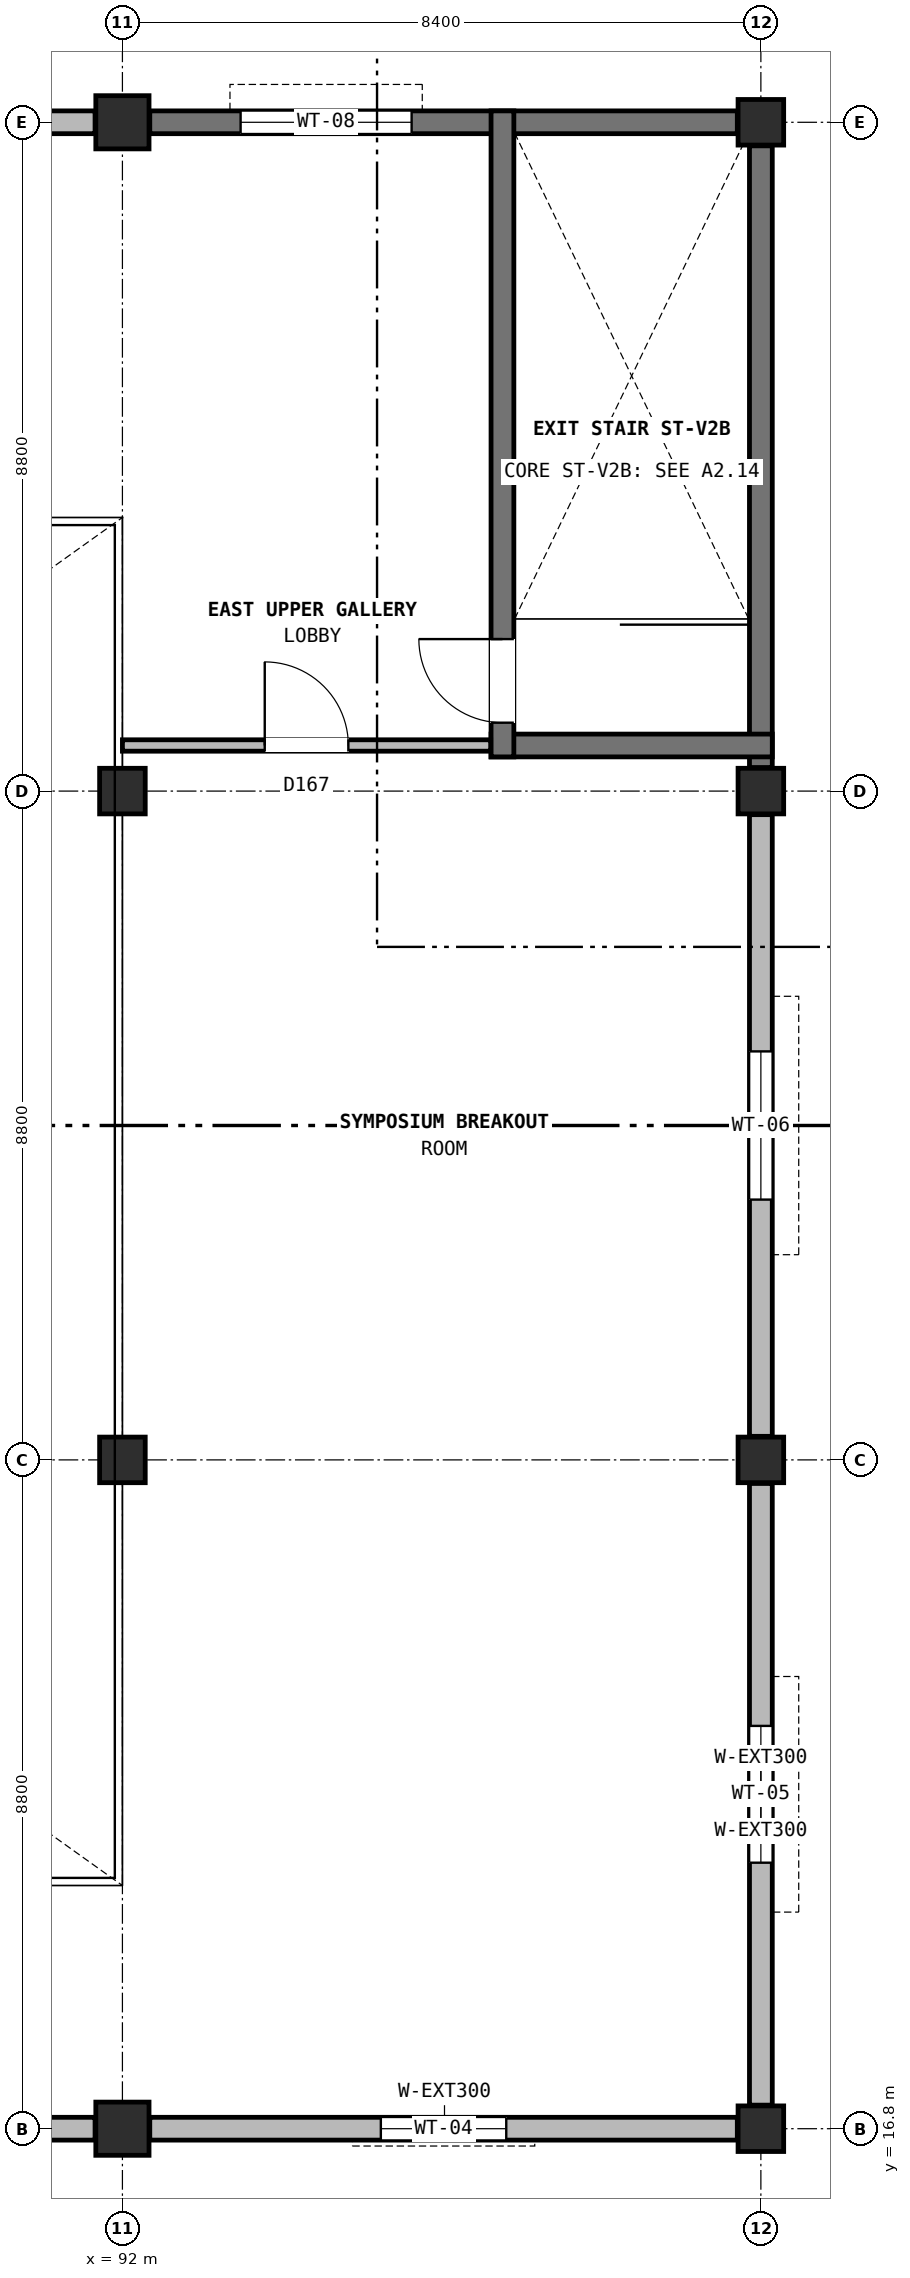
"""IFC4 building model, lengths in metres.
Left out: names, types, materials, properties, quantities, classifications, styles, units other than length and angle.
Written with IfcOpenShell. Run it as: python <this file> out.ifc"""

import sys

from ifc_helpers import new_model, si_unit, direction, frame, frame_2d, origin, origin_2d, place, context, subcontext, project, spatial, rectangle, extrude, element, fill, save


model = new_model("IFC4")
c1 = context("Model", 3, precision=1e-05, world=origin(), true_north=direction((0.0, 1.0)))
c2 = subcontext(c1, "Body", "Model", "MODEL_VIEW")
j1 = project(units=[si_unit("LENGTHUNIT", "METRE"), si_unit("PLANEANGLEUNIT", "RADIAN")], contexts=[c1])
p1 = place(None, origin())
s1 = spatial("IfcSite", under=j1, at=p1, CompositionType="ELEMENT")
p2 = place(p1, origin())
s2 = spatial("IfcBuilding", under=s1, at=p2, CompositionType="ELEMENT")
p3 = place(p2, frame((0.0, 0.0, 9.0)))
s3 = spatial("IfcBuildingStorey", under=s2, at=p3, CompositionType="ELEMENT", Elevation=9.0)
p4 = place(p3, frame((92.0, 16.8, 0.0), z_axis=(0.0, 0.0, 1.0), x_axis=(1.0, 0.0, 0.0)))
e1 = element("IfcColumn", 1, at=p4, inside=s3, PredefinedType="COLUMN", context=c2, shape_type="SweptSolid", body=[
    extrude(rectangle(XDim=0.7, YDim=0.7, at=origin_2d()), origin(), (0.0, 0.0, 1.0), 4.2),
])
for number, where, z_axis, x_axis in (
    (2, (92.0, 25.6, 0.0), (0.0, 0.0, 1.0), (1.0, 0.0, 0.0)),
    (3, (92.0, 34.4, 0.0), (0.0, 0.0, 1.0), (1.0, 0.0, 0.0)),
):
    element("IfcColumn", number, at=place(p3, frame(where, z_axis=z_axis, x_axis=x_axis)), inside=s3, PredefinedType="COLUMN", context=c2, shape_type="SweptSolid", body=[
        extrude(rectangle(XDim=0.6, YDim=0.6, at=origin_2d()), origin(), (0.0, 0.0, 1.0), 4.2),
    ])
p5 = place(p3, frame((92.0, 43.2, 0.0), z_axis=(0.0, 0.0, 1.0), x_axis=(1.0, 0.0, 0.0)))
e4 = element("IfcColumn", 4, at=p5, inside=s3, PredefinedType="COLUMN", context=c2, shape_type="SweptSolid", body=[
    extrude(rectangle(XDim=0.7, YDim=0.7, at=origin_2d()), origin(), (0.0, 0.0, 1.0), 4.2),
])
for number, where, z_axis, x_axis in (
    (5, (100.4, 16.8, 0.0), (0.0, 0.0, 1.0), (1.0, 0.0, 0.0)),
    (6, (100.4, 25.6, 0.0), (0.0, 0.0, 1.0), (1.0, 0.0, 0.0)),
    (7, (100.4, 34.4, 0.0), (0.0, 0.0, 1.0), (1.0, 0.0, 0.0)),
    (8, (100.4, 43.2, 0.0), (0.0, 0.0, 1.0), (1.0, 0.0, 0.0)),
):
    element("IfcColumn", number, at=place(p3, frame(where, z_axis=z_axis, x_axis=x_axis)), inside=s3, PredefinedType="COLUMN", context=c2, shape_type="SweptSolid", body=[
        extrude(rectangle(XDim=0.6, YDim=0.6, at=origin_2d()), origin(), (0.0, 0.0, 1.0), 4.2),
    ])
p6 = place(p3, frame((83.96, 16.8, 0.0), z_axis=(0.0, 0.0, 1.0), x_axis=(1.0, 0.0, 0.0)))
e9 = element("IfcWall", 9, at=p6, inside=s3, PredefinedType="SOLIDWALL", context=c2, shape_type="SweptSolid", body=[
    extrude(rectangle(XDim=7.68, YDim=0.3, at=frame_2d((3.84, 0.0))), origin(), (0.0, 0.0, 1.0), 3.45),
])
p7 = place(p3, frame((92.36, 16.8, 0.0), z_axis=(0.0, 0.0, 1.0), x_axis=(1.0, 0.0, 0.0)))
e10 = element("IfcWall", 10, at=p7, inside=s3, PredefinedType="SOLIDWALL", context=c2, shape_type="SweptSolid", body=[
    extrude(rectangle(XDim=7.73, YDim=0.3, at=frame_2d((3.865, 0.0))), origin(), (0.0, 0.0, 1.0), 3.45),
])
p8 = place(p7, frame((3.04, 0.0, 0.9)))
e11 = element("IfcOpeningElement", 11, at=p8, cuts=e10, PredefinedType="OPENING", context=c2, shape_type="SweptSolid", body=[
    extrude(rectangle(XDim=1.65, YDim=1.85, at=frame_2d((0.825, 0.925))), frame((0.0, 0.16, 0.0), z_axis=(0.0, -1.0, 0.0), x_axis=(1.0, 0.0, 0.0)), (0.0, 0.0, 1.0), 0.32),
])
p9 = place(p3, frame((100.4, 17.11, 0.0), z_axis=(0.0, 0.0, 1.0), x_axis=(0.0, 1.0, 0.0)))
e12 = element("IfcWall", 12, at=p9, inside=s3, PredefinedType="SOLIDWALL", context=c2, shape_type="SweptSolid", body=[
    extrude(rectangle(XDim=8.18, YDim=0.3, at=frame_2d((4.09, 0.0))), origin(), (0.0, 0.0, 1.0), 3.45),
])
p10 = place(p9, frame((3.19, 0.0, 0.9)))
e13 = element("IfcOpeningElement", 13, at=p10, cuts=e12, PredefinedType="OPENING", context=c2, shape_type="SweptSolid", body=[
    extrude(rectangle(XDim=1.8, YDim=1.9, at=frame_2d((0.9, 0.95))), frame((0.0, 0.16, 0.0), z_axis=(0.0, -1.0, 0.0), x_axis=(1.0, 0.0, 0.0)), (0.0, 0.0, 1.0), 0.32),
])
p11 = place(p3, frame((100.4, 25.91, 0.0), z_axis=(0.0, 0.0, 1.0), x_axis=(0.0, 1.0, 0.0)))
e14 = element("IfcWall", 14, at=p11, inside=s3, PredefinedType="SOLIDWALL", context=c2, shape_type="SweptSolid", body=[
    extrude(rectangle(XDim=8.18, YDim=0.3, at=frame_2d((4.09, 0.0))), origin(), (0.0, 0.0, 1.0), 3.45),
])
p12 = place(p11, frame((3.115, 0.0, 0.9)))
e15 = element("IfcOpeningElement", 15, at=p12, cuts=e14, PredefinedType="OPENING", context=c2, shape_type="SweptSolid", body=[
    extrude(rectangle(XDim=1.95, YDim=1.9, at=frame_2d((0.975, 0.95))), frame((0.0, 0.16, 0.0), z_axis=(0.0, -1.0, 0.0), x_axis=(1.0, 0.0, 0.0)), (0.0, 0.0, 1.0), 0.32),
])
p13 = place(p3, frame((100.4, 34.71, 0.0), z_axis=(0.0, 0.0, 1.0), x_axis=(0.0, 1.0, 0.0)))
e16 = element("IfcWall", 16, at=p13, inside=s3, PredefinedType="SHEAR", context=c2, shape_type="SweptSolid", body=[
    extrude(rectangle(XDim=8.18, YDim=0.3, at=frame_2d((4.09, 0.0))), origin(), (0.0, 0.0, 1.0), 3.45),
])
p14 = place(p3, frame((100.09, 43.2, 0.0), z_axis=(0.0, 0.0, 1.0), x_axis=(-1.0, 0.0, 0.0)))
e17 = element("IfcWall", 17, at=p14, inside=s3, PredefinedType="SHEAR", context=c2, shape_type="SweptSolid", body=[
    extrude(rectangle(XDim=7.73, YDim=0.3, at=frame_2d((3.865, 0.0))), origin(), (0.0, 0.0, 1.0), 3.45),
])
p15 = place(p14, frame((4.285, 0.0, 0.9)))
e18 = element("IfcOpeningElement", 18, at=p15, cuts=e17, PredefinedType="OPENING", context=c2, shape_type="SweptSolid", body=[
    extrude(rectangle(XDim=2.25, YDim=1.95, at=frame_2d((1.125, 0.975))), frame((0.0, 0.16, 0.0), z_axis=(0.0, -1.0, 0.0), x_axis=(1.0, 0.0, 0.0)), (0.0, 0.0, 1.0), 0.32),
])
p16 = place(p3, frame((91.64, 43.2, 0.0), z_axis=(0.0, 0.0, 1.0), x_axis=(-1.0, 0.0, 0.0)))
e19 = element("IfcWall", 19, at=p16, inside=s3, PredefinedType="SOLIDWALL", context=c2, shape_type="SweptSolid", body=[
    extrude(rectangle(XDim=7.68, YDim=0.3, at=frame_2d((3.84, 0.0))), origin(), (0.0, 0.0, 1.0), 3.45),
])
p17 = place(p3, frame((96.85, 35.0, 0.0), z_axis=(0.0, 0.0, 1.0), x_axis=(1.0, 0.0, 0.0)))
e20 = element("IfcWall", 20, at=p17, inside=s3, PredefinedType="SHEAR", context=c2, shape_type="SweptSolid", body=[
    extrude(rectangle(XDim=3.7, YDim=0.3, at=frame_2d((1.85, 0.0))), origin(), (0.0, 0.0, 1.0), 4.2),
])
p18 = place(p3, frame((97.0, 34.85, 0.0), z_axis=(0.0, 0.0, 1.0), x_axis=(0.0, 1.0, 0.0)))
e21 = element("IfcWall", 21, at=p18, inside=s3, PredefinedType="SHEAR", context=c2, shape_type="SweptSolid", body=[
    extrude(rectangle(XDim=8.5, YDim=0.3, at=frame_2d((4.25, 0.0))), origin(), (0.0, 0.0, 1.0), 4.2),
])
p19 = place(p18, frame((0.45, 0.0, 0.0)))
e22 = element("IfcOpeningElement", 22, at=p19, cuts=e21, PredefinedType="OPENING", context=c2, shape_type="SweptSolid", body=[
    extrude(rectangle(XDim=1.1, YDim=2.2, at=frame_2d((0.55, 1.1))), frame((0.0, 0.16, 0.0), z_axis=(0.0, -1.0, 0.0), x_axis=(1.0, 0.0, 0.0)), (0.0, 0.0, 1.0), 0.32),
])
p20 = place(p3, frame((92.0, 35.0, 0.0), z_axis=(0.0, 0.0, 1.0), x_axis=(1.0, 0.0, 0.0)))
e23 = element("IfcWall", 23, at=p20, inside=s3, PredefinedType="PARTITIONING", context=c2, shape_type="SweptSolid", body=[
    extrude(rectangle(XDim=4.845, YDim=0.15, at=frame_2d((2.422, 0.0))), origin(), (0.0, 0.0, 1.0), 3.865),
])
p21 = place(p20, frame((1.873, 0.0, 0.0)))
e24 = element("IfcOpeningElement", 24, at=p21, cuts=e23, PredefinedType="OPENING", context=c2, shape_type="SweptSolid", body=[
    extrude(rectangle(XDim=1.1, YDim=2.15, at=frame_2d((0.55, 1.075))), frame((0.0, 0.085, 0.0), z_axis=(0.0, -1.0, 0.0), x_axis=(1.0, 0.0, 0.0)), (0.0, 0.0, 1.0), 0.17),
])
p22 = place(p8, origin())
e25 = element("IfcWindow", 25, at=p22, inside=s3, PartitioningType="SINGLE_PANEL", PredefinedType="WINDOW", context=c2, shape_type="SweptSolid", body=[
    extrude(rectangle(XDim=1.65, YDim=1.85, at=frame_2d((0.825, 0.925))), frame((0.0, 0.03, 0.0), z_axis=(0.0, -1.0, 0.0), x_axis=(1.0, 0.0, 0.0)), (0.0, 0.0, 1.0), 0.06),
])
fill(e11, e25)
p23 = place(p10, origin())
e26 = element("IfcWindow", 26, at=p23, inside=s3, PartitioningType="SINGLE_PANEL", PredefinedType="WINDOW", context=c2, shape_type="SweptSolid", body=[
    extrude(rectangle(XDim=1.8, YDim=1.9, at=frame_2d((0.9, 0.95))), frame((0.0, 0.03, 0.0), z_axis=(0.0, -1.0, 0.0), x_axis=(1.0, 0.0, 0.0)), (0.0, 0.0, 1.0), 0.06),
])
fill(e13, e26)
p24 = place(p12, origin())
e27 = element("IfcWindow", 27, at=p24, inside=s3, PartitioningType="SINGLE_PANEL", PredefinedType="WINDOW", context=c2, shape_type="SweptSolid", body=[
    extrude(rectangle(XDim=1.95, YDim=1.9, at=frame_2d((0.975, 0.95))), frame((0.0, 0.03, 0.0), z_axis=(0.0, -1.0, 0.0), x_axis=(1.0, 0.0, 0.0)), (0.0, 0.0, 1.0), 0.06),
])
fill(e15, e27)
p25 = place(p15, origin())
e28 = element("IfcWindow", 28, at=p25, inside=s3, PartitioningType="SINGLE_PANEL", PredefinedType="WINDOW", context=c2, shape_type="SweptSolid", body=[
    extrude(rectangle(XDim=2.25, YDim=1.95, at=frame_2d((1.125, 0.975))), frame((0.0, 0.03, 0.0), z_axis=(0.0, -1.0, 0.0), x_axis=(1.0, 0.0, 0.0)), (0.0, 0.0, 1.0), 0.06),
])
fill(e18, e28)
p26 = place(p19, origin())
e29 = element("IfcDoor", 29, at=p26, inside=s3, OperationType="SINGLE_SWING_RIGHT", PredefinedType="DOOR", context=c2, shape_type="SweptSolid", body=[
    extrude(rectangle(XDim=1.1, YDim=2.2, at=frame_2d((0.55, 1.1))), frame((0.0, 0.025, 0.0), z_axis=(0.0, -1.0, 0.0), x_axis=(1.0, 0.0, 0.0)), (0.0, 0.0, 1.0), 0.05),
])
fill(e22, e29)
p27 = place(p21, origin())
e30 = element("IfcDoor", 30, at=p27, inside=s3, OperationType="SINGLE_SWING_LEFT", PredefinedType="DOOR", context=c2, shape_type="SweptSolid", body=[
    extrude(rectangle(XDim=1.1, YDim=2.15, at=frame_2d((0.55, 1.075))), frame((0.0, 0.025, 0.0), z_axis=(0.0, -1.0, 0.0), x_axis=(1.0, 0.0, 0.0)), (0.0, 0.0, 1.0), 0.05),
])
fill(e24, e30)
save(model, sys.argv[1])
